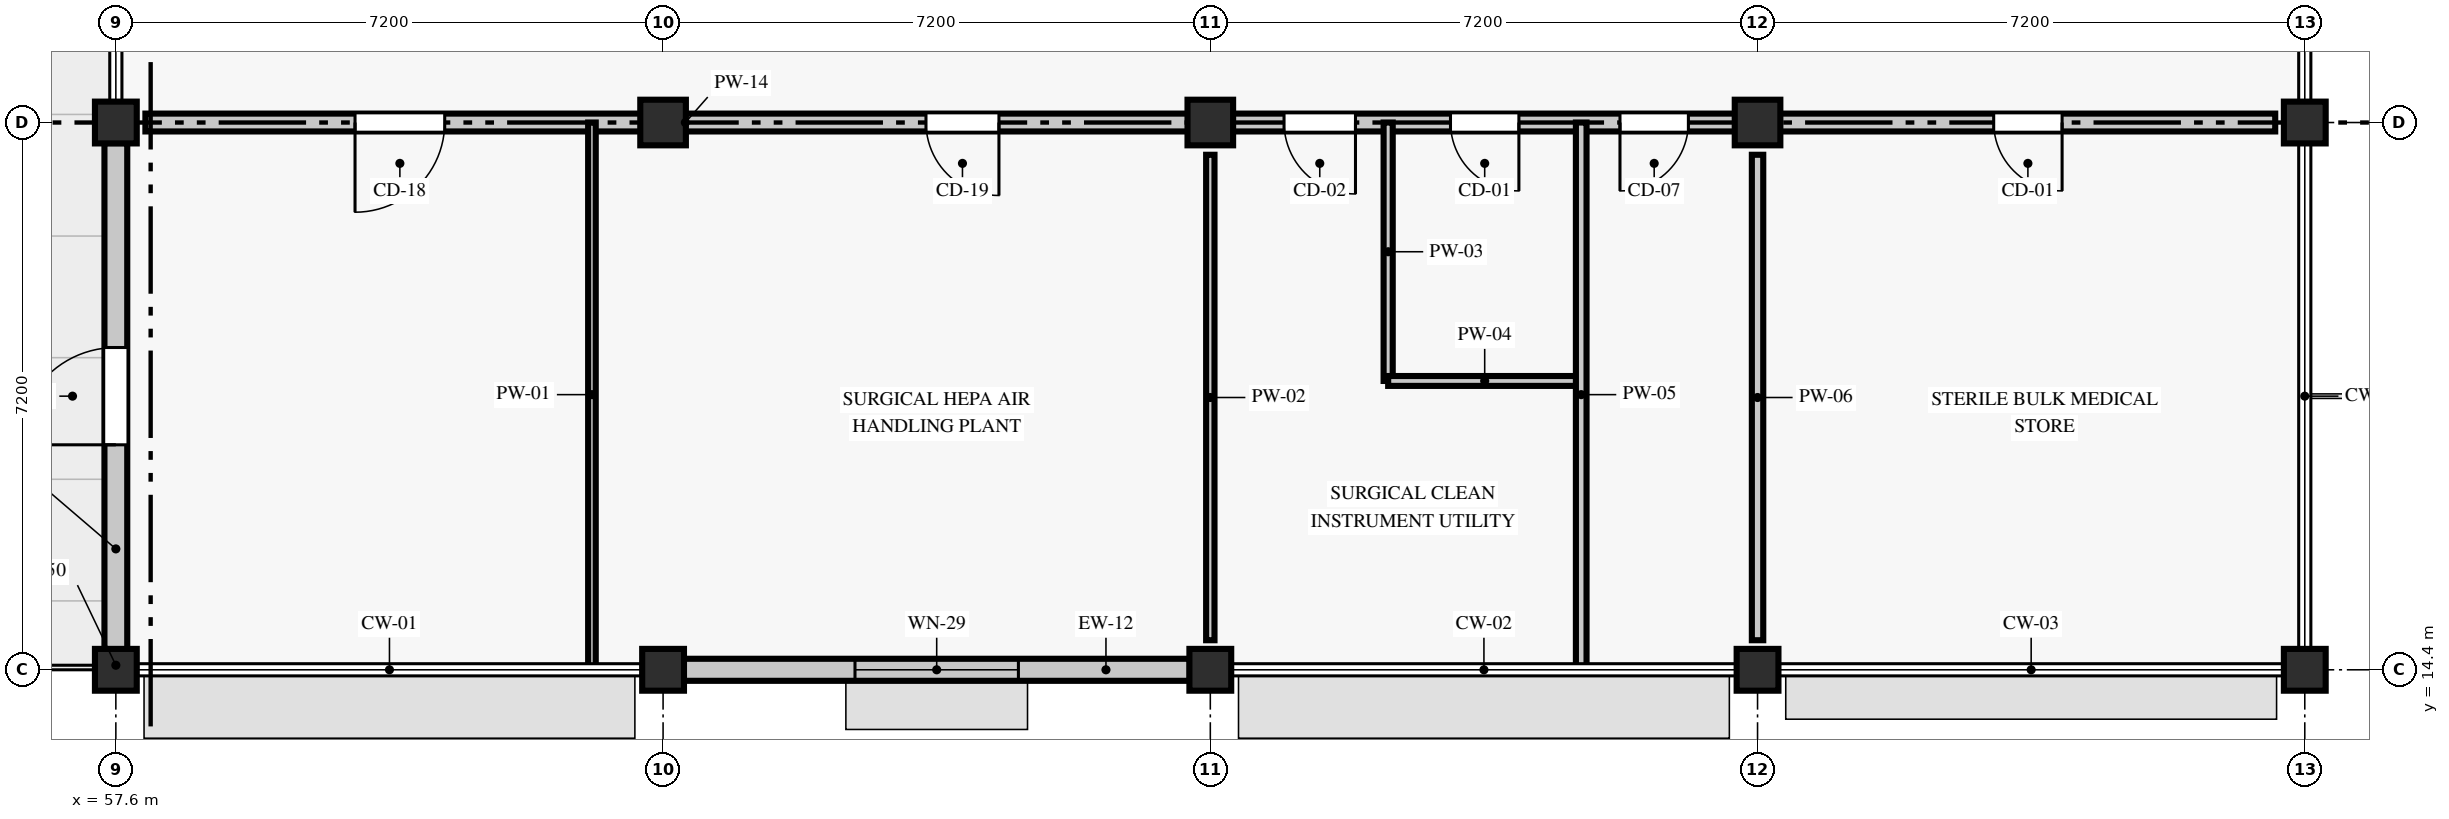
"""IFC4 building model, lengths in metres.
Left out: names, types, materials, properties, quantities, classifications, styles, units other than length and angle.
Written with IfcOpenShell. Run it as: python <this file> out.ifc"""

import sys

from ifc_helpers import new_model, si_unit, direction, frame, frame_2d, origin, origin_2d, place, context, subcontext, project, spatial, rectangle, extrude, element, fill, save


model = new_model("IFC4")
c1 = context("Model", 3, precision=1e-05, world=origin(), true_north=direction((0.0, 1.0)))
c2 = subcontext(c1, "Body", "Model", "MODEL_VIEW")
j1 = project(units=[si_unit("LENGTHUNIT", "METRE"), si_unit("PLANEANGLEUNIT", "RADIAN")], contexts=[c1])
p1 = place(None, origin())
s1 = spatial("IfcSite", under=j1, at=p1, CompositionType="ELEMENT")
p2 = place(p1, origin())
s2 = spatial("IfcBuilding", under=s1, at=p2, CompositionType="ELEMENT")
p3 = place(p2, frame((0.0, 0.0, 13.8)))
s3 = spatial("IfcBuildingStorey", under=s2, at=p3, CompositionType="ELEMENT", Elevation=13.8)
for number, where, z_axis, x_axis in (
    (1, (57.6, 14.4, 0.0), (0.0, 0.0, 1.0), (1.0, 0.0, 0.0)),
    (2, (57.6, 21.6, 0.0), (0.0, 0.0, 1.0), (1.0, 0.0, 0.0)),
    (3, (64.8, 14.4, 0.0), (0.0, 0.0, 1.0), (1.0, 0.0, 0.0)),
):
    element("IfcColumn", number, at=place(p3, frame(where, z_axis=z_axis, x_axis=x_axis)), inside=s3, PredefinedType="COLUMN", context=c2, shape_type="SweptSolid", body=[
        extrude(rectangle(XDim=0.55, YDim=0.55, at=origin_2d()), origin(), (0.0, 0.0, 1.0), 4.2),
    ])
p4 = place(p3, frame((64.8, 21.6, 0.0), z_axis=(0.0, 0.0, 1.0), x_axis=(1.0, 0.0, 0.0)))
e4 = element("IfcColumn", 4, at=p4, inside=s3, PredefinedType="COLUMN", context=c2, shape_type="SweptSolid", body=[
    extrude(rectangle(XDim=0.6, YDim=0.6, at=origin_2d()), origin(), (0.0, 0.0, 1.0), 4.2),
])
p5 = place(p3, frame((72.0, 14.4, 0.0), z_axis=(0.0, 0.0, 1.0), x_axis=(1.0, 0.0, 0.0)))
e5 = element("IfcColumn", 5, at=p5, inside=s3, PredefinedType="COLUMN", context=c2, shape_type="SweptSolid", body=[
    extrude(rectangle(XDim=0.55, YDim=0.55, at=origin_2d()), origin(), (0.0, 0.0, 1.0), 4.2),
])
p6 = place(p3, frame((72.0, 21.6, 0.0), z_axis=(0.0, 0.0, 1.0), x_axis=(1.0, 0.0, 0.0)))
e6 = element("IfcColumn", 6, at=p6, inside=s3, PredefinedType="COLUMN", context=c2, shape_type="SweptSolid", body=[
    extrude(rectangle(XDim=0.6, YDim=0.6, at=origin_2d()), origin(), (0.0, 0.0, 1.0), 4.2),
])
p7 = place(p3, frame((79.2, 14.4, 0.0), z_axis=(0.0, 0.0, 1.0), x_axis=(1.0, 0.0, 0.0)))
e7 = element("IfcColumn", 7, at=p7, inside=s3, PredefinedType="COLUMN", context=c2, shape_type="SweptSolid", body=[
    extrude(rectangle(XDim=0.55, YDim=0.55, at=origin_2d()), origin(), (0.0, 0.0, 1.0), 4.2),
])
p8 = place(p3, frame((79.2, 21.6, 0.0), z_axis=(0.0, 0.0, 1.0), x_axis=(1.0, 0.0, 0.0)))
e8 = element("IfcColumn", 8, at=p8, inside=s3, PredefinedType="COLUMN", context=c2, shape_type="SweptSolid", body=[
    extrude(rectangle(XDim=0.6, YDim=0.6, at=origin_2d()), origin(), (0.0, 0.0, 1.0), 4.2),
])
for number, where, z_axis, x_axis in (
    (9, (86.4, 14.4, 0.0), (0.0, 0.0, 1.0), (1.0, 0.0, 0.0)),
    (10, (86.4, 21.6, 0.0), (0.0, 0.0, 1.0), (1.0, 0.0, 0.0)),
):
    element("IfcColumn", number, at=place(p3, frame(where, z_axis=z_axis, x_axis=x_axis)), inside=s3, PredefinedType="COLUMN", context=c2, shape_type="SweptSolid", body=[
        extrude(rectangle(XDim=0.55, YDim=0.55, at=origin_2d()), origin(), (0.0, 0.0, 1.0), 4.2),
    ])
p9 = place(p3, frame((65.071, 14.4, 0.0), z_axis=(0.0, 0.0, 1.0), x_axis=(1.0, 0.0, 0.0)))
e11 = element("IfcWall", 11, at=p9, inside=s3, PredefinedType="STANDARD", context=c2, shape_type="SweptSolid", body=[
    extrude(rectangle(XDim=6.658, YDim=0.29, at=frame_2d((3.329, 0.0))), origin(), (0.0, 0.0, 1.0), 3.55),
])
p10 = place(p9, frame((2.254, 0.0, 0.9)))
e12 = element("IfcOpeningElement", 12, at=p10, cuts=e11, PredefinedType="OPENING", context=c2, shape_type="SweptSolid", body=[
    extrude(rectangle(XDim=2.15, YDim=1.54, at=frame_2d((1.075, 0.77))), frame((0.0, 0.155, 0.0), z_axis=(0.0, -1.0, 0.0), x_axis=(1.0, 0.0, 0.0)), (0.0, 0.0, 1.0), 0.31),
])
p11 = place(p3, frame((57.6, 21.329, 0.0), z_axis=(0.0, 0.0, 1.0), x_axis=(0.0, -1.0, 0.0)))
e13 = element("IfcWall", 13, at=p11, inside=s3, PredefinedType="STANDARD", context=c2, shape_type="SweptSolid", body=[
    extrude(rectangle(XDim=6.658, YDim=0.3, at=frame_2d((3.329, 0.0))), origin(), (0.0, 0.0, 1.0), 3.55),
])
p12 = place(p11, frame((2.689, 0.0, 0.0)))
e14 = element("IfcOpeningElement", 14, at=p12, cuts=e13, PredefinedType="OPENING", context=c2, shape_type="SweptSolid", body=[
    extrude(rectangle(XDim=1.28, YDim=2.15, at=frame_2d((0.64, 1.075))), frame((0.0, 0.16, 0.0), z_axis=(0.0, -1.0, 0.0), x_axis=(1.0, 0.0, 0.0)), (0.0, 0.0, 1.0), 0.32),
])
p13 = place(p3, frame((57.989, 21.6, 0.0), z_axis=(0.0, 0.0, 1.0), x_axis=(1.0, 0.0, 0.0)))
e15 = element("IfcWall", 15, at=p13, inside=s3, PredefinedType="PARTITIONING", context=c2, shape_type="SweptSolid", body=[
    extrude(rectangle(XDim=28.022, YDim=0.235, at=frame_2d((14.011, 0.0))), origin(), (0.0, 0.0, 1.0), 3.35),
])
p14 = place(p13, frame((2.758, 0.0, 0.0)))
e16 = element("IfcOpeningElement", 16, at=p14, cuts=e15, PredefinedType="OPENING", context=c2, shape_type="SweptSolid", body=[
    extrude(rectangle(XDim=1.18, YDim=2.18, at=frame_2d((0.59, 1.09))), frame((0.0, 0.127, 0.0), z_axis=(0.0, -1.0, 0.0), x_axis=(1.0, 0.0, 0.0)), (0.0, 0.0, 1.0), 0.255),
])
p15 = place(p13, frame((10.27, 0.0, 0.0)))
e17 = element("IfcOpeningElement", 17, at=p15, cuts=e15, PredefinedType="OPENING", context=c2, shape_type="SweptSolid", body=[
    extrude(rectangle(XDim=0.96, YDim=2.23, at=frame_2d((0.48, 1.115))), frame((0.0, 0.127, 0.0), z_axis=(0.0, -1.0, 0.0), x_axis=(1.0, 0.0, 0.0)), (0.0, 0.0, 1.0), 0.255),
])
p16 = place(p13, frame((14.981, 0.0, 0.0)))
e18 = element("IfcOpeningElement", 18, at=p16, cuts=e15, PredefinedType="OPENING", context=c2, shape_type="SweptSolid", body=[
    extrude(rectangle(XDim=0.94, YDim=2.08, at=frame_2d((0.47, 1.04))), frame((0.0, 0.127, 0.0), z_axis=(0.0, -1.0, 0.0), x_axis=(1.0, 0.0, 0.0)), (0.0, 0.0, 1.0), 0.255),
])
p17 = place(p13, frame((17.171, 0.0, 0.0)))
e19 = element("IfcOpeningElement", 19, at=p17, cuts=e15, PredefinedType="OPENING", context=c2, shape_type="SweptSolid", body=[
    extrude(rectangle(XDim=0.9, YDim=2.08, at=frame_2d((0.45, 1.04))), frame((0.0, 0.127, 0.0), z_axis=(0.0, -1.0, 0.0), x_axis=(1.0, 0.0, 0.0)), (0.0, 0.0, 1.0), 0.255),
])
p18 = place(p13, frame((19.401, 0.0, 0.0)))
e20 = element("IfcOpeningElement", 20, at=p18, cuts=e15, PredefinedType="OPENING", context=c2, shape_type="SweptSolid", body=[
    extrude(rectangle(XDim=0.9, YDim=2.13, at=frame_2d((0.45, 1.065))), frame((0.0, 0.127, 0.0), z_axis=(0.0, -1.0, 0.0), x_axis=(1.0, 0.0, 0.0)), (0.0, 0.0, 1.0), 0.255),
])
p19 = place(p13, frame((24.318, 0.0, 0.0)))
e21 = element("IfcOpeningElement", 21, at=p19, cuts=e15, PredefinedType="OPENING", context=c2, shape_type="SweptSolid", body=[
    extrude(rectangle(XDim=0.9, YDim=2.08, at=frame_2d((0.45, 1.04))), frame((0.0, 0.127, 0.0), z_axis=(0.0, -1.0, 0.0), x_axis=(1.0, 0.0, 0.0)), (0.0, 0.0, 1.0), 0.255),
])
p20 = place(p3, frame((63.864, 14.44, 0.0), z_axis=(0.0, 0.0, 1.0), x_axis=(0.0, 1.0, 0.0)))
e22 = element("IfcWall", 22, at=p20, inside=s3, PredefinedType="PARTITIONING", context=c2, shape_type="SweptSolid", body=[
    extrude(rectangle(XDim=7.16, YDim=0.1, at=frame_2d((3.58, 0.0))), origin(), (0.0, 0.0, 1.0), 3.35),
])
p21 = place(p3, frame((72.0, 14.789, 0.0), z_axis=(0.0, 0.0, 1.0), x_axis=(0.0, 1.0, 0.0)))
e23 = element("IfcWall", 23, at=p21, inside=s3, PredefinedType="PARTITIONING", context=c2, shape_type="SweptSolid", body=[
    extrude(rectangle(XDim=6.387, YDim=0.11, at=frame_2d((3.193, 0.0))), origin(), (0.0, 0.0, 1.0), 3.6),
])
p22 = place(p3, frame((74.34, 18.2, 0.0), z_axis=(0.0, 0.0, 1.0), x_axis=(0.0, 1.0, 0.0)))
e24 = element("IfcWall", 24, at=p22, inside=s3, PredefinedType="PARTITIONING", context=c2, shape_type="SweptSolid", body=[
    extrude(rectangle(XDim=3.4, YDim=0.12, at=frame_2d((1.7, 0.0))), origin(), (0.0, 0.0, 1.0), 3.35),
])
p23 = place(p3, frame((74.34, 18.2, 0.0), z_axis=(0.0, 0.0, 1.0), x_axis=(1.0, 0.0, 0.0)))
e25 = element("IfcWall", 25, at=p23, inside=s3, PredefinedType="PARTITIONING", context=c2, shape_type="SweptSolid", body=[
    extrude(rectangle(XDim=2.54, YDim=0.13, at=frame_2d((1.27, 0.0))), origin(), (0.0, 0.0, 1.0), 3.7),
])
p24 = place(p3, frame((76.88, 14.44, 0.0), z_axis=(0.0, 0.0, 1.0), x_axis=(0.0, 1.0, 0.0)))
e26 = element("IfcWall", 26, at=p24, inside=s3, PredefinedType="PARTITIONING", context=c2, shape_type="SweptSolid", body=[
    extrude(rectangle(XDim=7.16, YDim=0.14, at=frame_2d((3.58, 0.0))), origin(), (0.0, 0.0, 1.0), 3.35),
])
p25 = place(p3, frame((79.2, 14.789, 0.0), z_axis=(0.0, 0.0, 1.0), x_axis=(0.0, 1.0, 0.0)))
e27 = element("IfcWall", 27, at=p25, inside=s3, PredefinedType="PARTITIONING", context=c2, shape_type="SweptSolid", body=[
    extrude(rectangle(XDim=6.387, YDim=0.15, at=frame_2d((3.193, 0.0))), origin(), (0.0, 0.0, 1.0), 3.6),
])
p26 = place(p10, origin())
e28 = element("IfcWindow", 28, at=p26, inside=s3, PartitioningType="SINGLE_PANEL", PredefinedType="WINDOW", context=c2, shape_type="SweptSolid", body=[
    extrude(rectangle(XDim=2.15, YDim=1.54, at=frame_2d((1.075, 0.77))), frame((0.0, 0.03, 0.0), z_axis=(0.0, -1.0, 0.0), x_axis=(1.0, 0.0, 0.0)), (0.0, 0.0, 1.0), 0.06),
])
fill(e12, e28)
p27 = place(p12, frame((1.28, 0.0, 0.0), z_axis=(0.0, 0.0, 1.0), x_axis=(-1.0, 0.0, 0.0)))
e29 = element("IfcDoor", 29, at=p27, inside=s3, OperationType="SINGLE_SWING_LEFT", PredefinedType="DOOR", context=c2, shape_type="SweptSolid", body=[
    extrude(rectangle(XDim=1.28, YDim=2.15, at=frame_2d((0.64, 1.075))), frame((0.0, 0.025, 0.0), z_axis=(0.0, -1.0, 0.0), x_axis=(1.0, 0.0, 0.0)), (0.0, 0.0, 1.0), 0.05),
])
fill(e14, e29)
p28 = place(p14, frame((1.18, 0.0, 0.0), z_axis=(0.0, 0.0, 1.0), x_axis=(-1.0, 0.0, 0.0)))
e30 = element("IfcDoor", 30, at=p28, inside=s3, OperationType="SINGLE_SWING_RIGHT", PredefinedType="DOOR", context=c2, shape_type="SweptSolid", body=[
    extrude(rectangle(XDim=1.18, YDim=2.18, at=frame_2d((0.59, 1.09))), frame((0.0, 0.025, 0.0), z_axis=(0.0, -1.0, 0.0), x_axis=(1.0, 0.0, 0.0)), (0.0, 0.0, 1.0), 0.05),
])
fill(e16, e30)
p29 = place(p15, frame((0.96, 0.0, 0.0), z_axis=(0.0, 0.0, 1.0), x_axis=(-1.0, 0.0, 0.0)))
e31 = element("IfcDoor", 31, at=p29, inside=s3, OperationType="SINGLE_SWING_LEFT", PredefinedType="DOOR", context=c2, shape_type="SweptSolid", body=[
    extrude(rectangle(XDim=0.96, YDim=2.23, at=frame_2d((0.48, 1.115))), frame((0.0, 0.025, 0.0), z_axis=(0.0, -1.0, 0.0), x_axis=(1.0, 0.0, 0.0)), (0.0, 0.0, 1.0), 0.05),
])
fill(e17, e31)
p30 = place(p16, frame((0.94, 0.0, 0.0), z_axis=(0.0, 0.0, 1.0), x_axis=(-1.0, 0.0, 0.0)))
e32 = element("IfcDoor", 32, at=p30, inside=s3, OperationType="SINGLE_SWING_LEFT", PredefinedType="DOOR", context=c2, shape_type="SweptSolid", body=[
    extrude(rectangle(XDim=0.94, YDim=2.08, at=frame_2d((0.47, 1.04))), frame((0.0, 0.025, 0.0), z_axis=(0.0, -1.0, 0.0), x_axis=(1.0, 0.0, 0.0)), (0.0, 0.0, 1.0), 0.05),
])
fill(e18, e32)
p31 = place(p17, frame((0.9, 0.0, 0.0), z_axis=(0.0, 0.0, 1.0), x_axis=(-1.0, 0.0, 0.0)))
e33 = element("IfcDoor", 33, at=p31, inside=s3, OperationType="SINGLE_SWING_LEFT", PredefinedType="DOOR", context=c2, shape_type="SweptSolid", body=[
    extrude(rectangle(XDim=0.9, YDim=2.08, at=frame_2d((0.45, 1.04))), frame((0.0, 0.025, 0.0), z_axis=(0.0, -1.0, 0.0), x_axis=(1.0, 0.0, 0.0)), (0.0, 0.0, 1.0), 0.05),
])
fill(e19, e33)
p32 = place(p18, frame((0.9, 0.0, 0.0), z_axis=(0.0, 0.0, 1.0), x_axis=(-1.0, 0.0, 0.0)))
e34 = element("IfcDoor", 34, at=p32, inside=s3, OperationType="SINGLE_SWING_RIGHT", PredefinedType="DOOR", context=c2, shape_type="SweptSolid", body=[
    extrude(rectangle(XDim=0.9, YDim=2.13, at=frame_2d((0.45, 1.065))), frame((0.0, 0.025, 0.0), z_axis=(0.0, -1.0, 0.0), x_axis=(1.0, 0.0, 0.0)), (0.0, 0.0, 1.0), 0.05),
])
fill(e20, e34)
p33 = place(p19, frame((0.9, 0.0, 0.0), z_axis=(0.0, 0.0, 1.0), x_axis=(-1.0, 0.0, 0.0)))
e35 = element("IfcDoor", 35, at=p33, inside=s3, OperationType="SINGLE_SWING_LEFT", PredefinedType="DOOR", context=c2, shape_type="SweptSolid", body=[
    extrude(rectangle(XDim=0.9, YDim=2.08, at=frame_2d((0.45, 1.04))), frame((0.0, 0.025, 0.0), z_axis=(0.0, -1.0, 0.0), x_axis=(1.0, 0.0, 0.0)), (0.0, 0.0, 1.0), 0.05),
])
fill(e21, e35)
save(model, sys.argv[1])
